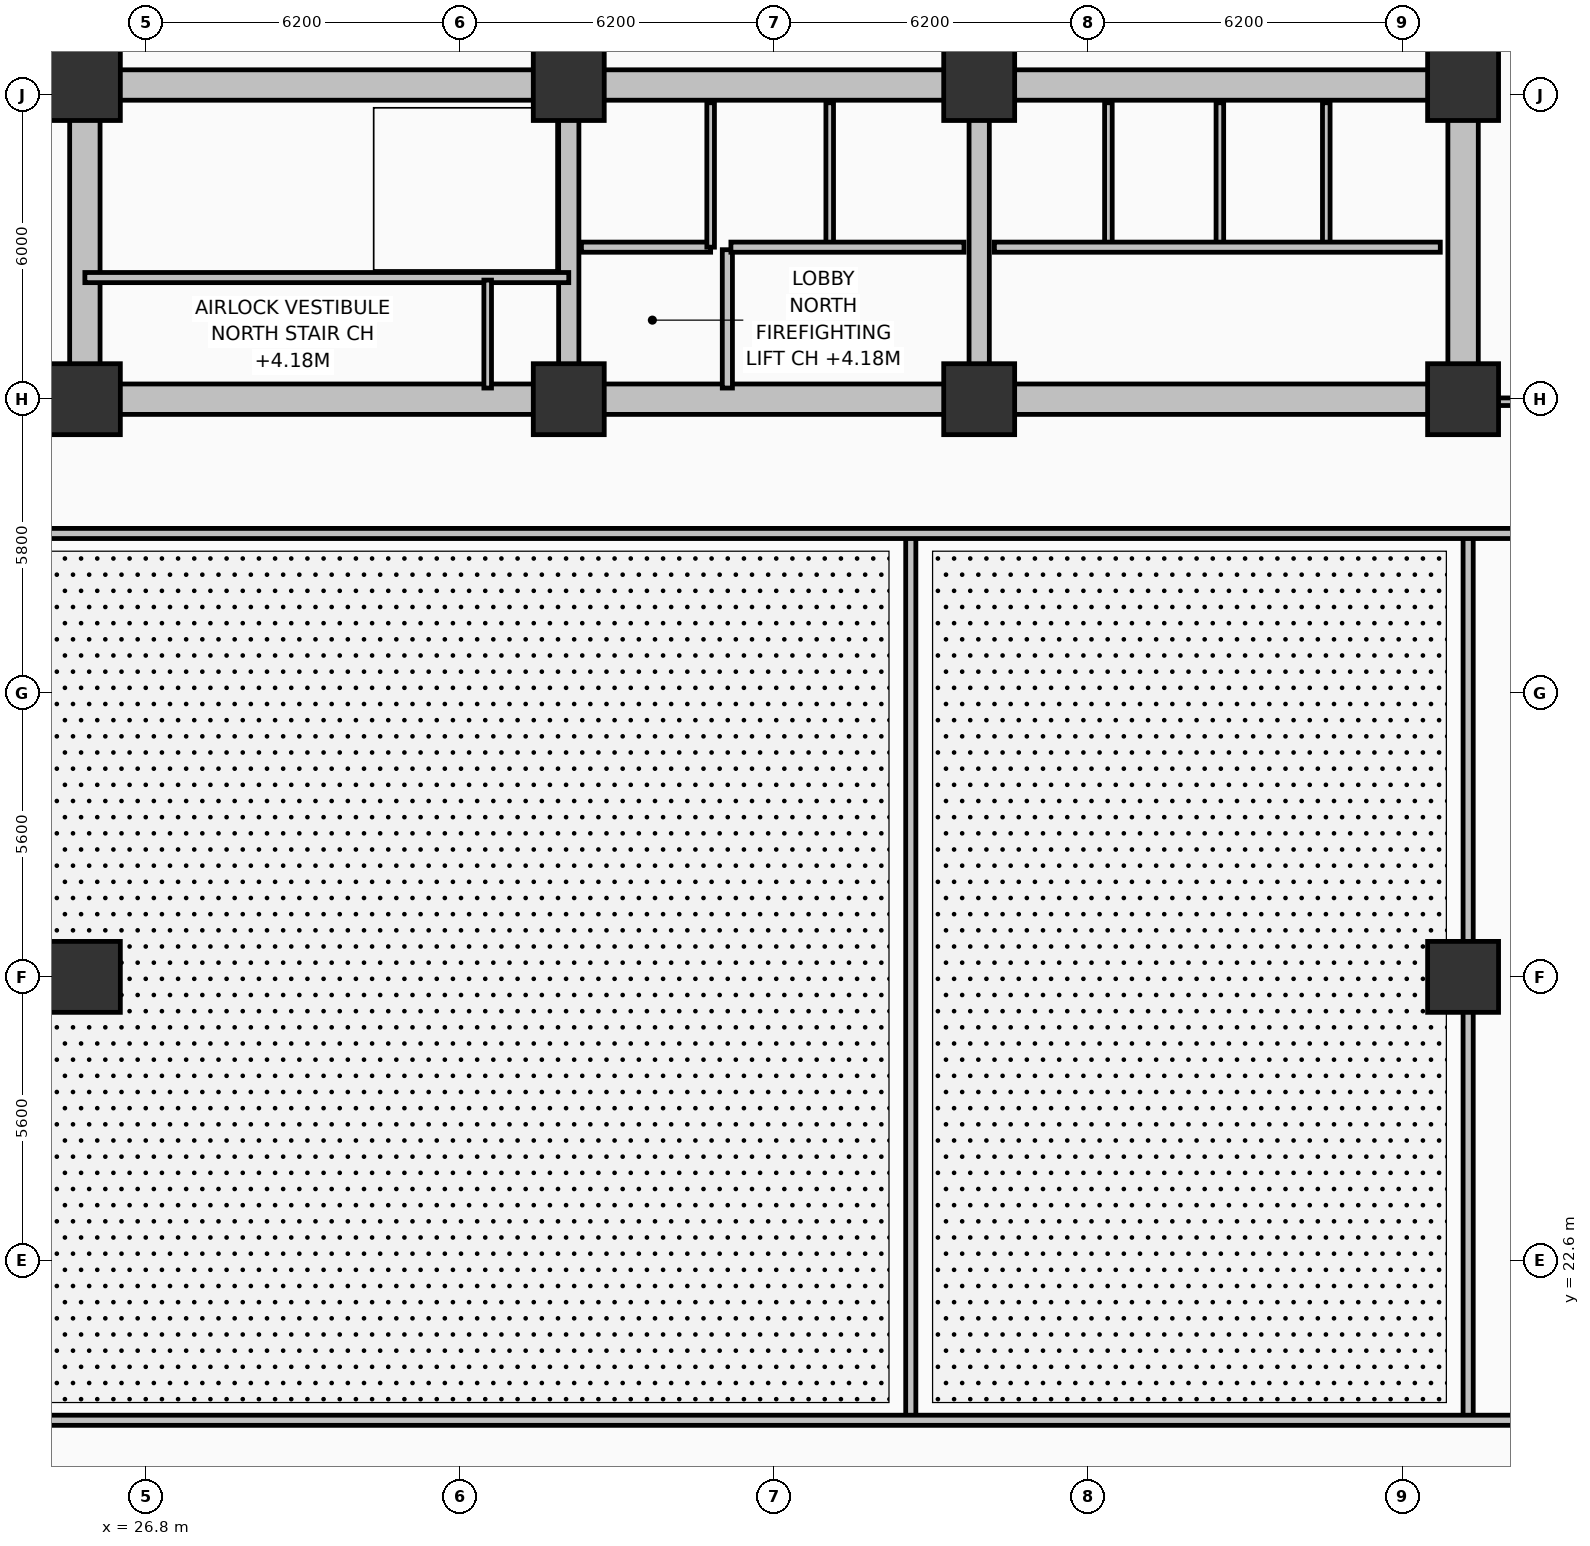
"""IFC4 building model, lengths in metres.
Left out: names, types, materials, properties, quantities, classifications, styles, units other than length and angle.
Written with IfcOpenShell. Run it as: python <this file> out.ifc"""

import sys

from ifc_helpers import new_model, si_unit, direction, frame, frame_2d, origin, origin_2d, place, context, subcontext, project, spatial, rectangle, extrude, element, fill, save


model = new_model("IFC4")
c1 = context("Model", 3, precision=1e-05, world=origin(), true_north=direction((0.0, 1.0)))
c2 = subcontext(c1, "Body", "Model", "MODEL_VIEW")
j1 = project(units=[si_unit("LENGTHUNIT", "METRE"), si_unit("PLANEANGLEUNIT", "RADIAN")], contexts=[c1])
p1 = place(None, origin())
s1 = spatial("IfcSite", under=j1, at=p1, CompositionType="ELEMENT")
p2 = place(p1, origin())
s2 = spatial("IfcBuilding", under=s1, at=p2, CompositionType="ELEMENT")
p3 = place(p2, frame((0.0, 0.0, 11.1)))
s3 = spatial("IfcBuildingStorey", under=s2, at=p3, CompositionType="ELEMENT", Elevation=11.1)
p4 = place(p3, frame((25.6, 45.8, 0.0), z_axis=(0.0, 0.0, 1.0), x_axis=(1.0, 0.0, 0.0)))
e1 = element("IfcWall", 1, at=p4, inside=s3, PredefinedType="SHEAR", context=c2, shape_type="SweptSolid", body=[
    extrude(rectangle(XDim=27.2, YDim=0.6, at=frame_2d((13.6, 0.0))), origin(), (0.0, 0.0, 1.0), 4.5),
])
for number, where, z_axis, x_axis in (
    (2, (25.6, 39.9, 0.0), (0.0, 0.0, 1.0), (0.0, 1.0, 0.0)),
    (3, (52.8, 39.9, 0.0), (0.0, 0.0, 1.0), (0.0, 1.0, 0.0)),
):
    element("IfcWall", number, at=place(p3, frame(where, z_axis=z_axis, x_axis=x_axis)), inside=s3, PredefinedType="SHEAR", context=c2, shape_type="SweptSolid", body=[
        extrude(rectangle(XDim=5.6, YDim=0.6, at=frame_2d((2.8, 0.0))), origin(), (0.0, 0.0, 1.0), 4.5),
    ])
p5 = place(p3, frame((52.8, 39.6, 0.0), z_axis=(0.0, 0.0, 1.0), x_axis=(-1.0, 0.0, 0.0)))
e4 = element("IfcWall", 4, at=p5, inside=s3, PredefinedType="SHEAR", context=c2, shape_type="SweptSolid", body=[
    extrude(rectangle(XDim=27.2, YDim=0.6, at=frame_2d((13.6, 0.0))), origin(), (0.0, 0.0, 1.0), 4.5),
])
p6 = place(p5, frame((24.2, 0.0, 0.0)))
e5 = element("IfcOpeningElement", 5, at=p6, cuts=e4, PredefinedType="OPENING", context=c2, shape_type="SweptSolid", body=[
    extrude(rectangle(XDim=1.1, YDim=2.15, at=frame_2d((0.55, 1.075))), frame((0.0, 0.31, 0.0), z_axis=(0.0, -1.0, 0.0), x_axis=(1.0, 0.0, 0.0)), (0.0, 0.0, 1.0), 0.62),
])
p7 = place(p5, frame((15.1, 0.0, 0.0)))
e6 = element("IfcOpeningElement", 6, at=p7, cuts=e4, PredefinedType="OPENING", context=c2, shape_type="SweptSolid", body=[
    extrude(rectangle(XDim=1.2, YDim=2.15, at=frame_2d((0.6, 1.075))), frame((0.0, 0.31, 0.0), z_axis=(0.0, -1.0, 0.0), x_axis=(1.0, 0.0, 0.0)), (0.0, 0.0, 1.0), 0.62),
])
p8 = place(p5, frame((11.6, 0.0, 0.0)))
e7 = element("IfcOpeningElement", 7, at=p8, cuts=e4, PredefinedType="OPENING", context=c2, shape_type="SweptSolid", body=[
    extrude(rectangle(XDim=0.9, YDim=2.1, at=frame_2d((0.45, 1.05))), frame((0.0, 0.31, 0.0), z_axis=(0.0, -1.0, 0.0), x_axis=(1.0, 0.0, 0.0)), (0.0, 0.0, 1.0), 0.62),
])
p9 = place(p5, frame((3.6, 0.0, 0.0)))
e8 = element("IfcOpeningElement", 8, at=p9, cuts=e4, PredefinedType="OPENING", context=c2, shape_type="SweptSolid", body=[
    extrude(rectangle(XDim=1.0, YDim=2.15, at=frame_2d((0.5, 1.075))), frame((0.0, 0.31, 0.0), z_axis=(0.0, -1.0, 0.0), x_axis=(1.0, 0.0, 0.0)), (0.0, 0.0, 1.0), 0.62),
])
for number, where, z_axis, x_axis in (
    (9, (35.15, 39.9, 0.0), (0.0, 0.0, 1.0), (0.0, 1.0, 0.0)),
    (10, (43.25, 39.9, 0.0), (0.0, 0.0, 1.0), (0.0, 1.0, 0.0)),
):
    element("IfcWall", number, at=place(p3, frame(where, z_axis=z_axis, x_axis=x_axis)), inside=s3, PredefinedType="SHEAR", context=c2, shape_type="SweptSolid", body=[
        extrude(rectangle(XDim=5.6, YDim=0.4, at=frame_2d((2.8, 0.0))), origin(), (0.0, 0.0, 1.0), 4.5),
    ])
for number, where, z_axis, x_axis in (
    (11, (25.6, 39.6, 0.0), (0.0, 0.0, 1.0), (1.0, 0.0, 0.0)),
    (12, (25.6, 45.8, 0.0), (0.0, 0.0, 1.0), (1.0, 0.0, 0.0)),
    (13, (35.15, 39.6, 0.0), (0.0, 0.0, 1.0), (1.0, 0.0, 0.0)),
    (14, (35.15, 45.8, 0.0), (0.0, 0.0, 1.0), (1.0, 0.0, 0.0)),
    (15, (43.25, 39.6, 0.0), (0.0, 0.0, 1.0), (1.0, 0.0, 0.0)),
    (16, (43.25, 45.8, 0.0), (0.0, 0.0, 1.0), (1.0, 0.0, 0.0)),
    (17, (52.8, 39.6, 0.0), (0.0, 0.0, 1.0), (1.0, 0.0, 0.0)),
    (18, (52.8, 45.8, 0.0), (0.0, 0.0, 1.0), (1.0, 0.0, 0.0)),
    (19, (25.6, 28.2, 0.0), (0.0, 0.0, 1.0), (1.0, 0.0, 0.0)),
    (20, (52.8, 28.2, 0.0), (0.0, 0.0, 1.0), (1.0, 0.0, 0.0)),
):
    element("IfcColumn", number, at=place(p3, frame(where, z_axis=z_axis, x_axis=x_axis)), inside=s3, PredefinedType="COLUMN", context=c2, shape_type="SweptSolid", body=[
        extrude(rectangle(XDim=1.4, YDim=1.4, at=origin_2d()), origin(), (0.0, 0.0, 1.0), 4.5),
    ])
p10 = place(p3, frame((35.15, 42.0, 0.0), z_axis=(0.0, 0.0, 1.0), x_axis=(-1.0, 0.0, 0.0)))
e21 = element("IfcWall", 21, at=p10, inside=s3, PredefinedType="SHEAR", context=c2, shape_type="SweptSolid", body=[
    extrude(rectangle(XDim=9.55, YDim=0.2, at=frame_2d((4.775, 0.0))), origin(), (0.0, 0.0, 1.0), 4.5),
])
p11 = place(p10, frame((7.25, 0.0, 0.0)))
e22 = element("IfcOpeningElement", 22, at=p11, cuts=e21, PredefinedType="OPENING", context=c2, shape_type="SweptSolid", body=[
    extrude(rectangle(XDim=1.1, YDim=2.15, at=frame_2d((0.55, 1.075))), frame((0.0, 0.11, 0.0), z_axis=(0.0, -1.0, 0.0), x_axis=(1.0, 0.0, 0.0)), (0.0, 0.0, 1.0), 0.22),
])
p12 = place(p3, frame((33.55, 39.82, 0.0), z_axis=(0.0, 0.0, 1.0), x_axis=(0.0, 1.0, 0.0)))
e23 = element("IfcWall", 23, at=p12, inside=s3, PredefinedType="PARTITIONING", context=c2, shape_type="SweptSolid", body=[
    extrude(rectangle(XDim=2.13, YDim=0.15, at=frame_2d((1.065, 0.0))), origin(), (0.0, 0.0, 1.0), 3.42),
])
p13 = place(p12, frame((0.55, 0.0, 0.0)))
e24 = element("IfcOpeningElement", 24, at=p13, cuts=e23, PredefinedType="OPENING", context=c2, shape_type="SweptSolid", body=[
    extrude(rectangle(XDim=0.85, YDim=2.05, at=frame_2d((0.425, 1.025))), frame((0.0, 0.085, 0.0), z_axis=(0.0, -1.0, 0.0), x_axis=(1.0, 0.0, 0.0)), (0.0, 0.0, 1.0), 0.17),
])
p14 = place(p3, frame((37.95, 42.6, 0.0), z_axis=(0.0, 0.0, 1.0), x_axis=(-1.0, 0.0, 0.0)))
e25 = element("IfcWall", 25, at=p14, inside=s3, PredefinedType="PARTITIONING", context=c2, shape_type="SweptSolid", body=[
    extrude(rectangle(XDim=2.55, YDim=0.2, at=frame_2d((1.275, 0.0))), origin(), (0.0, 0.0, 1.0), 3.08),
])
p15 = place(p14, frame((0.75, 0.0, 0.0)))
e26 = element("IfcOpeningElement", 26, at=p15, cuts=e25, PredefinedType="OPENING", context=c2, shape_type="SweptSolid", body=[
    extrude(rectangle(XDim=1.1, YDim=2.15, at=frame_2d((0.55, 1.075))), frame((0.0, 0.11, 0.0), z_axis=(0.0, -1.0, 0.0), x_axis=(1.0, 0.0, 0.0)), (0.0, 0.0, 1.0), 0.22),
])
p16 = place(p3, frame((37.95, 42.6, 0.0), z_axis=(0.0, 0.0, 1.0), x_axis=(0.0, 1.0, 0.0)))
e27 = element("IfcWall", 27, at=p16, inside=s3, PredefinedType="PARTITIONING", context=c2, shape_type="SweptSolid", body=[
    extrude(rectangle(XDim=2.85, YDim=0.15, at=frame_2d((1.425, 0.0))), origin(), (0.0, 0.0, 1.0), 3.42),
])
p17 = place(p3, frame((38.28, 39.82, 0.0), z_axis=(0.0, 0.0, 1.0), x_axis=(0.0, 1.0, 0.0)))
e28 = element("IfcWall", 28, at=p17, inside=s3, PredefinedType="PARTITIONING", context=c2, shape_type="SweptSolid", body=[
    extrude(rectangle(XDim=2.73, YDim=0.2, at=frame_2d((1.365, 0.0))), origin(), (0.0, 0.0, 1.0), 3.42),
])
p18 = place(p3, frame((40.3, 42.65, 0.0), z_axis=(0.0, 0.0, 1.0), x_axis=(0.0, 1.0, 0.0)))
e29 = element("IfcWall", 29, at=p18, inside=s3, PredefinedType="PARTITIONING", context=c2, shape_type="SweptSolid", body=[
    extrude(rectangle(XDim=2.8, YDim=0.15, at=frame_2d((1.4, 0.0))), origin(), (0.0, 0.0, 1.0), 3.42),
])
p19 = place(p3, frame((42.95, 42.6, 0.0), z_axis=(0.0, 0.0, 1.0), x_axis=(-1.0, 0.0, 0.0)))
e30 = element("IfcWall", 30, at=p19, inside=s3, PredefinedType="PARTITIONING", context=c2, shape_type="SweptSolid", body=[
    extrude(rectangle(XDim=4.6, YDim=0.2, at=frame_2d((2.3, 0.0))), origin(), (0.0, 0.0, 1.0), 3.08),
])
for number, where, z_axis, x_axis in (
    (31, (45.8, 42.65, 0.0), (0.0, 0.0, 1.0), (0.0, 1.0, 0.0)),
    (32, (48.0, 42.65, 0.0), (0.0, 0.0, 1.0), (0.0, 1.0, 0.0)),
    (33, (50.1, 42.65, 0.0), (0.0, 0.0, 1.0), (0.0, 1.0, 0.0)),
):
    element("IfcWall", number, at=place(p3, frame(where, z_axis=z_axis, x_axis=x_axis)), inside=s3, PredefinedType="PARTITIONING", context=c2, shape_type="SweptSolid", body=[
        extrude(rectangle(XDim=2.8, YDim=0.15, at=frame_2d((1.4, 0.0))), origin(), (0.0, 0.0, 1.0), 3.42),
    ])
p20 = place(p3, frame((52.35, 42.6, 0.0), z_axis=(0.0, 0.0, 1.0), x_axis=(-1.0, 0.0, 0.0)))
e34 = element("IfcWall", 34, at=p20, inside=s3, PredefinedType="PARTITIONING", context=c2, shape_type="SweptSolid", body=[
    extrude(rectangle(XDim=8.8, YDim=0.2, at=frame_2d((4.4, 0.0))), origin(), (0.0, 0.0, 1.0), 3.42),
])
for number, where, z_axis, x_axis in (
    (35, (41.9, 19.5, 0.0), (0.0, 0.0, 1.0), (0.0, 1.0, 0.0)),
    (36, (52.9, 19.5, 0.0), (0.0, 0.0, 1.0), (0.0, 1.0, 0.0)),
):
    element("IfcWall", number, at=place(p3, frame(where, z_axis=z_axis, x_axis=x_axis)), inside=s3, PredefinedType="PARTITIONING", context=c2, shape_type="SweptSolid", body=[
        extrude(rectangle(XDim=17.4, YDim=0.2, at=frame_2d((8.7, 0.0))), origin(), (0.0, 0.0, 1.0), 3.42),
    ])
p21 = place(p3, frame((15.95, 19.45, 0.0), z_axis=(0.0, 0.0, 1.0), x_axis=(1.0, 0.0, 0.0)))
e37 = element("IfcWall", 37, at=p21, inside=s3, PredefinedType="PARTITIONING", context=c2, shape_type="SweptSolid", body=[
    extrude(rectangle(XDim=46.5, YDim=0.2, at=frame_2d((23.25, 0.0))), origin(), (0.0, 0.0, 1.0), 3.42),
])
p22 = place(p21, frame((2.65, 0.0, 0.0)))
e38 = element("IfcOpeningElement", 38, at=p22, cuts=e37, PredefinedType="OPENING", context=c2, shape_type="SweptSolid", body=[
    extrude(rectangle(XDim=1.2, YDim=2.15, at=frame_2d((0.6, 1.075))), frame((0.0, 0.11, 0.0), z_axis=(0.0, -1.0, 0.0), x_axis=(1.0, 0.0, 0.0)), (0.0, 0.0, 1.0), 0.22),
])
p23 = place(p21, frame((28.65, 0.0, 0.0)))
e39 = element("IfcOpeningElement", 39, at=p23, cuts=e37, PredefinedType="OPENING", context=c2, shape_type="SweptSolid", body=[
    extrude(rectangle(XDim=1.2, YDim=2.15, at=frame_2d((0.6, 1.075))), frame((0.0, 0.11, 0.0), z_axis=(0.0, -1.0, 0.0), x_axis=(1.0, 0.0, 0.0)), (0.0, 0.0, 1.0), 0.22),
])
p24 = place(p21, frame((39.65, 0.0, 0.0)))
e40 = element("IfcOpeningElement", 40, at=p24, cuts=e37, PredefinedType="OPENING", context=c2, shape_type="SweptSolid", body=[
    extrude(rectangle(XDim=1.2, YDim=2.15, at=frame_2d((0.6, 1.075))), frame((0.0, 0.11, 0.0), z_axis=(0.0, -1.0, 0.0), x_axis=(1.0, 0.0, 0.0)), (0.0, 0.0, 1.0), 0.22),
])
p25 = place(p3, frame((62.45, 36.95, 0.0), z_axis=(0.0, 0.0, 1.0), x_axis=(-1.0, 0.0, 0.0)))
e41 = element("IfcWall", 41, at=p25, inside=s3, PredefinedType="PARTITIONING", context=c2, shape_type="SweptSolid", body=[
    extrude(rectangle(XDim=46.5, YDim=0.2, at=frame_2d((23.25, 0.0))), origin(), (0.0, 0.0, 1.0), 3.42),
])
p26 = place(p25, frame((23.25, 0.0, 0.0)))
e42 = element("IfcOpeningElement", 42, at=p26, cuts=e41, PredefinedType="OPENING", context=c2, shape_type="SweptSolid", body=[
    extrude(rectangle(XDim=1.2, YDim=2.15, at=frame_2d((0.6, 1.075))), frame((0.0, 0.11, 0.0), z_axis=(0.0, -1.0, 0.0), x_axis=(1.0, 0.0, 0.0)), (0.0, 0.0, 1.0), 0.22),
])
p27 = place(p25, frame((12.25, 0.0, 0.0)))
e43 = element("IfcOpeningElement", 43, at=p27, cuts=e41, PredefinedType="OPENING", context=c2, shape_type="SweptSolid", body=[
    extrude(rectangle(XDim=1.2, YDim=2.15, at=frame_2d((0.6, 1.075))), frame((0.0, 0.11, 0.0), z_axis=(0.0, -1.0, 0.0), x_axis=(1.0, 0.0, 0.0)), (0.0, 0.0, 1.0), 0.22),
])
p28 = place(p25, frame((2.65, 0.0, 0.0)))
e44 = element("IfcOpeningElement", 44, at=p28, cuts=e41, PredefinedType="OPENING", context=c2, shape_type="SweptSolid", body=[
    extrude(rectangle(XDim=1.2, YDim=2.15, at=frame_2d((0.6, 1.075))), frame((0.0, 0.11, 0.0), z_axis=(0.0, -1.0, 0.0), x_axis=(1.0, 0.0, 0.0)), (0.0, 0.0, 1.0), 0.22),
])
p29 = place(p3, frame((25.25, 39.55, 0.0), z_axis=(0.0, 0.0, 1.0), x_axis=(-1.0, 0.0, 0.0)))
e45 = element("IfcWall", 45, at=p29, inside=s3, PredefinedType="PARTITIONING", context=c2, shape_type="SweptSolid", body=[
    extrude(rectangle(XDim=13.25, YDim=0.15, at=frame_2d((6.625, 0.0))), origin(), (0.0, 0.0, 1.0), 3.42),
])
p30 = place(p29, frame((4.2, 0.0, 0.0)))
e46 = element("IfcOpeningElement", 46, at=p30, cuts=e45, PredefinedType="OPENING", context=c2, shape_type="SweptSolid", body=[
    extrude(rectangle(XDim=1.0, YDim=2.15, at=frame_2d((0.5, 1.075))), frame((0.0, 0.085, 0.0), z_axis=(0.0, -1.0, 0.0), x_axis=(1.0, 0.0, 0.0)), (0.0, 0.0, 1.0), 0.17),
])
p31 = place(p3, frame((66.4, 39.55, 0.0), z_axis=(0.0, 0.0, 1.0), x_axis=(-1.0, 0.0, 0.0)))
e47 = element("IfcWall", 47, at=p31, inside=s3, PredefinedType="PARTITIONING", context=c2, shape_type="SweptSolid", body=[
    extrude(rectangle(XDim=13.25, YDim=0.15, at=frame_2d((6.625, 0.0))), origin(), (0.0, 0.0, 1.0), 3.42),
])
p32 = place(p31, frame((5.5, 0.0, 0.0)))
e48 = element("IfcOpeningElement", 48, at=p32, cuts=e47, PredefinedType="OPENING", context=c2, shape_type="SweptSolid", body=[
    extrude(rectangle(XDim=1.0, YDim=2.15, at=frame_2d((0.5, 1.075))), frame((0.0, 0.085, 0.0), z_axis=(0.0, -1.0, 0.0), x_axis=(1.0, 0.0, 0.0)), (0.0, 0.0, 1.0), 0.17),
])
p33 = place(p11, origin())
e49 = element("IfcDoor", 49, at=p33, inside=s3, OperationType="SINGLE_SWING_RIGHT", PredefinedType="DOOR", context=c2, shape_type="SweptSolid", body=[
    extrude(rectangle(XDim=1.1, YDim=2.15, at=frame_2d((0.55, 1.075))), frame((0.0, 0.025, 0.0), z_axis=(0.0, -1.0, 0.0), x_axis=(1.0, 0.0, 0.0)), (0.0, 0.0, 1.0), 0.05),
])
fill(e22, e49)
p34 = place(p13, origin())
e50 = element("IfcDoor", 50, at=p34, inside=s3, OperationType="SINGLE_SWING_LEFT", PredefinedType="TRAPDOOR", context=c2, shape_type="SweptSolid", body=[
    extrude(rectangle(XDim=0.85, YDim=2.05, at=frame_2d((0.425, 1.025))), frame((0.0, 0.025, 0.0), z_axis=(0.0, -1.0, 0.0), x_axis=(1.0, 0.0, 0.0)), (0.0, 0.0, 1.0), 0.05),
])
fill(e24, e50)
p35 = place(p15, origin())
e51 = element("IfcDoor", 51, at=p35, inside=s3, OperationType="SLIDING_TO_LEFT", PredefinedType="DOOR", context=c2, shape_type="SweptSolid", body=[
    extrude(rectangle(XDim=1.1, YDim=2.15, at=frame_2d((0.55, 1.075))), frame((0.0, 0.025, 0.0), z_axis=(0.0, -1.0, 0.0), x_axis=(1.0, 0.0, 0.0)), (0.0, 0.0, 1.0), 0.05),
])
fill(e26, e51)
p36 = place(p23, origin())
e52 = element("IfcDoor", 52, at=p36, inside=s3, OperationType="SINGLE_SWING_RIGHT", PredefinedType="DOOR", context=c2, shape_type="SweptSolid", body=[
    extrude(rectangle(XDim=1.2, YDim=2.15, at=frame_2d((0.6, 1.075))), frame((0.0, 0.025, 0.0), z_axis=(0.0, -1.0, 0.0), x_axis=(1.0, 0.0, 0.0)), (0.0, 0.0, 1.0), 0.05),
])
fill(e39, e52)
p37 = place(p26, origin())
e53 = element("IfcDoor", 53, at=p37, inside=s3, OperationType="SINGLE_SWING_RIGHT", PredefinedType="DOOR", context=c2, shape_type="SweptSolid", body=[
    extrude(rectangle(XDim=1.2, YDim=2.15, at=frame_2d((0.6, 1.075))), frame((0.0, 0.025, 0.0), z_axis=(0.0, -1.0, 0.0), x_axis=(1.0, 0.0, 0.0)), (0.0, 0.0, 1.0), 0.05),
])
fill(e42, e53)
p38 = place(p27, origin())
e54 = element("IfcDoor", 54, at=p38, inside=s3, OperationType="SINGLE_SWING_LEFT", PredefinedType="DOOR", context=c2, shape_type="SweptSolid", body=[
    extrude(rectangle(XDim=1.2, YDim=2.15, at=frame_2d((0.6, 1.075))), frame((0.0, 0.025, 0.0), z_axis=(0.0, -1.0, 0.0), x_axis=(1.0, 0.0, 0.0)), (0.0, 0.0, 1.0), 0.05),
])
fill(e43, e54)
p39 = place(p6, origin())
e55 = element("IfcDoor", 55, at=p39, inside=s3, OperationType="SINGLE_SWING_LEFT", PredefinedType="DOOR", context=c2, shape_type="SweptSolid", body=[
    extrude(rectangle(XDim=1.1, YDim=2.15, at=frame_2d((0.55, 1.075))), frame((0.0, 0.025, 0.0), z_axis=(0.0, -1.0, 0.0), x_axis=(1.0, 0.0, 0.0)), (0.0, 0.0, 1.0), 0.05),
])
fill(e5, e55)
p40 = place(p7, origin())
e56 = element("IfcDoor", 56, at=p40, inside=s3, OperationType="SINGLE_SWING_RIGHT", PredefinedType="DOOR", context=c2, shape_type="SweptSolid", body=[
    extrude(rectangle(XDim=1.2, YDim=2.15, at=frame_2d((0.6, 1.075))), frame((0.0, 0.025, 0.0), z_axis=(0.0, -1.0, 0.0), x_axis=(1.0, 0.0, 0.0)), (0.0, 0.0, 1.0), 0.05),
])
fill(e6, e56)
p41 = place(p8, origin())
e57 = element("IfcDoor", 57, at=p41, inside=s3, OperationType="SINGLE_SWING_LEFT", PredefinedType="DOOR", context=c2, shape_type="SweptSolid", body=[
    extrude(rectangle(XDim=0.9, YDim=2.1, at=frame_2d((0.45, 1.05))), frame((0.0, 0.025, 0.0), z_axis=(0.0, -1.0, 0.0), x_axis=(1.0, 0.0, 0.0)), (0.0, 0.0, 1.0), 0.05),
])
fill(e7, e57)
p42 = place(p9, origin())
e58 = element("IfcDoor", 58, at=p42, inside=s3, OperationType="SINGLE_SWING_LEFT", PredefinedType="DOOR", context=c2, shape_type="SweptSolid", body=[
    extrude(rectangle(XDim=1.0, YDim=2.15, at=frame_2d((0.5, 1.075))), frame((0.0, 0.025, 0.0), z_axis=(0.0, -1.0, 0.0), x_axis=(1.0, 0.0, 0.0)), (0.0, 0.0, 1.0), 0.05),
])
fill(e8, e58)
save(model, sys.argv[1])
